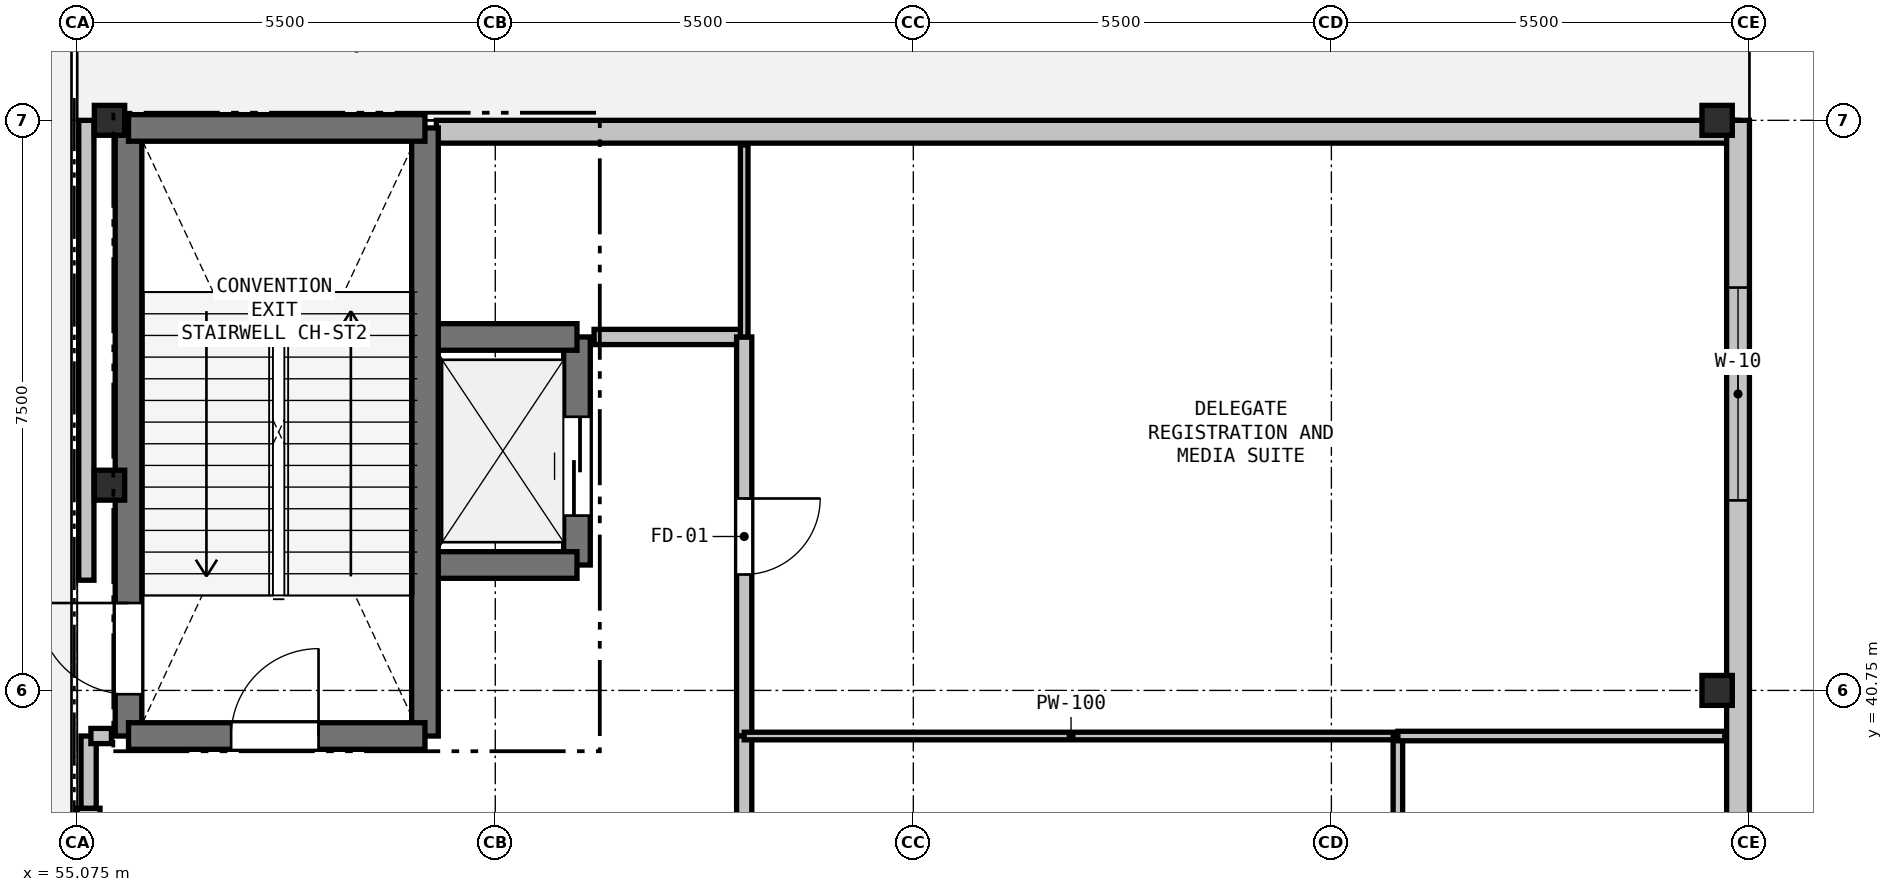
"""IFC4 building model, lengths in metres.
Left out: names, types, materials, properties, quantities, classifications, styles, units other than length and angle.
Written with IfcOpenShell. Run it as: python <this file> out.ifc"""

import sys

from ifc_helpers import new_model, si_unit, direction, frame, frame_2d, origin, origin_2d, place, context, subcontext, project, spatial, rectangle, i_section, extrude, element, fill, save


model = new_model("IFC4")
c1 = context("Model", 3, precision=1e-05, world=origin(), true_north=direction((0.0, 1.0)))
c2 = subcontext(c1, "Body", "Model", "MODEL_VIEW")
j1 = project(units=[si_unit("LENGTHUNIT", "METRE"), si_unit("PLANEANGLEUNIT", "RADIAN")], contexts=[c1])
p1 = place(None, origin())
s1 = spatial("IfcSite", under=j1, at=p1, CompositionType="ELEMENT")
p2 = place(p1, origin())
s2 = spatial("IfcBuilding", under=s1, at=p2, CompositionType="ELEMENT")
p3 = place(p2, origin())
s3 = spatial("IfcBuildingStorey", under=s2, at=p3, CompositionType="ELEMENT", Elevation=0.0)
for number, where, z_axis, x_axis in (
    (1, (55.5, 43.45, 0.0), (0.0, 0.0, 1.0), (1.0, 0.0, 0.0)),
    (2, (55.5, 48.25, 0.0), (0.0, 0.0, 1.0), (1.0, 0.0, 0.0)),
    (3, (76.65, 40.75, 0.0), (0.0, 0.0, 1.0), (1.0, 0.0, 0.0)),
    (4, (76.65, 48.25, 0.0), (0.0, 0.0, 1.0), (1.0, 0.0, 0.0)),
):
    element("IfcColumn", number, at=place(p3, frame(where, z_axis=z_axis, x_axis=x_axis)), inside=s3, PredefinedType="COLUMN", context=c2, shape_type="SweptSolid", body=[
        extrude(i_section(OverallWidth=0.399, OverallDepth=0.394, WebThickness=0.023, FlangeThickness=0.037, at=origin_2d()), origin(), (0.0, 0.0, 1.0), 5.1),
    ])
p4 = place(p3, frame((55.195, 42.2, 0.0), z_axis=(0.0, 0.0, 1.0), x_axis=(0.0, 1.0, 0.0)))
e5 = element("IfcWall", 5, at=p4, inside=s3, PredefinedType="PARAPET", context=c2, shape_type="SweptSolid", body=[
    extrude(rectangle(XDim=6.05, YDim=0.2, at=frame_2d((3.025, 0.0))), origin(), (0.0, 0.0, 1.0), 4.39),
])
p5 = place(p3, frame((59.8, 48.1, 0.0), z_axis=(0.0, 0.0, 1.0), x_axis=(1.0, 0.0, 0.0)))
e6 = element("IfcWall", 6, at=p5, inside=s3, PredefinedType="SOLIDWALL", context=c2, shape_type="SweptSolid", body=[
    extrude(rectangle(XDim=17.125, YDim=0.3, at=frame_2d((8.562, 0.0))), origin(), (0.0, 0.0, 1.0), 3.914),
])
p6 = place(p3, frame((76.925, 48.25, 0.0), z_axis=(0.0, 0.0, 1.0), x_axis=(0.0, -1.0, 0.0)))
e7 = element("IfcWall", 7, at=p6, inside=s3, PredefinedType="SOLIDWALL", context=c2, shape_type="SweptSolid", body=[
    extrude(rectangle(XDim=9.35, YDim=0.3, at=frame_2d((4.675, 0.0))), origin(), (0.0, 0.0, 1.0), 4.39),
])
p7 = place(p6, frame((2.2, 0.0, 0.9)))
e8 = element("IfcOpeningElement", 8, at=p7, cuts=e7, PredefinedType="OPENING", context=c2, shape_type="SweptSolid", body=[
    extrude(rectangle(XDim=2.8, YDim=2.4, at=frame_2d((1.4, 1.2))), frame((0.0, 0.16, 0.0), z_axis=(0.0, -1.0, 0.0), x_axis=(1.0, 0.0, 0.0)), (0.0, 0.0, 1.0), 0.32),
])
p8 = place(p3, frame((55.225, 22.4, 0.0), z_axis=(0.0, 0.0, 1.0), x_axis=(0.0, 1.0, 0.0)))
e9 = element("IfcWall", 9, at=p8, inside=s3, PredefinedType="SOLIDWALL", context=c2, shape_type="SweptSolid", body=[
    extrude(rectangle(XDim=16.8, YDim=0.3, at=frame_2d((8.4, 0.0))), origin(), (0.0, 0.0, 1.0), 2.6),
])
p9 = place(p8, frame((3.5, 0.0, 0.0)))
e10 = element("IfcOpeningElement", 10, at=p9, cuts=e9, PredefinedType="OPENING", context=c2, shape_type="SweptSolid", body=[
    extrude(rectangle(XDim=2.4, YDim=2.4, at=frame_2d((1.2, 1.2))), frame((0.0, 0.16, 0.0), z_axis=(0.0, -1.0, 0.0), x_axis=(1.0, 0.0, 0.0)), (0.0, 0.0, 1.0), 0.32),
])
p10 = place(p8, frame((10.5, 0.0, 0.0)))
e11 = element("IfcOpeningElement", 11, at=p10, cuts=e9, PredefinedType="OPENING", context=c2, shape_type="SweptSolid", body=[
    extrude(rectangle(XDim=2.4, YDim=2.4, at=frame_2d((1.2, 1.2))), frame((0.0, 0.16, 0.0), z_axis=(0.0, -1.0, 0.0), x_axis=(1.0, 0.0, 0.0)), (0.0, 0.0, 1.0), 0.32),
])
p11 = place(p3, frame((61.65, 42.4, 0.0), z_axis=(0.0, 0.0, 1.0), x_axis=(0.0, 1.0, 0.0)))
e12 = element("IfcWall", 12, at=p11, inside=s3, PredefinedType="SHEAR", context=c2, shape_type="SweptSolid", body=[
    extrude(rectangle(XDim=3.0, YDim=0.35, at=frame_2d((1.5, 0.0))), origin(), (0.0, 0.0, 1.0), 4.8),
])
p12 = place(p11, frame((0.65, 0.0, 0.0)))
e13 = element("IfcOpeningElement", 13, at=p12, cuts=e12, PredefinedType="OPENING", context=c2, shape_type="SweptSolid", body=[
    extrude(rectangle(XDim=1.3, YDim=2.2, at=frame_2d((0.65, 1.1))), frame((0.0, 0.185, 0.0), z_axis=(0.0, -1.0, 0.0), x_axis=(1.0, 0.0, 0.0)), (0.0, 0.0, 1.0), 0.37),
])
for number, where, z_axis, x_axis in (
    (14, (59.65, 45.4, 0.0), (0.0, 0.0, 1.0), (1.0, 0.0, 0.0)),
    (15, (59.65, 42.4, 0.0), (0.0, 0.0, 1.0), (1.0, 0.0, 0.0)),
):
    element("IfcWall", number, at=place(p3, frame(where, z_axis=z_axis, x_axis=x_axis)), inside=s3, PredefinedType="SHEAR", context=c2, shape_type="SweptSolid", body=[
        extrude(rectangle(XDim=2.0, YDim=0.35, at=frame_2d((1.0, 0.0))), origin(), (0.0, 0.0, 1.0), 4.8),
    ])
p13 = place(p3, frame((59.65, 48.15, 0.0), z_axis=(0.0, 0.0, 1.0), x_axis=(0.0, -1.0, 0.0)))
e16 = element("IfcWall", 16, at=p13, inside=s3, PredefinedType="SHEAR", context=c2, shape_type="SweptSolid", body=[
    extrude(rectangle(XDim=8.0, YDim=0.35, at=frame_2d((4.0, 0.0))), origin(), (0.0, 0.0, 1.0), 4.8),
])
p14 = place(p3, frame((55.75, 40.15, 0.0), z_axis=(0.0, 0.0, 1.0), x_axis=(0.0, 1.0, 0.0)))
e17 = element("IfcWall", 17, at=p14, inside=s3, PredefinedType="SHEAR", context=c2, shape_type="SweptSolid", body=[
    extrude(rectangle(XDim=8.0, YDim=0.35, at=frame_2d((4.0, 0.0))), origin(), (0.0, 0.0, 1.0), 4.8),
])
p15 = place(p14, frame((0.55, 0.0, 0.0)))
e18 = element("IfcOpeningElement", 18, at=p15, cuts=e17, PredefinedType="OPENING", context=c2, shape_type="SweptSolid", body=[
    extrude(rectangle(XDim=1.2, YDim=2.2, at=frame_2d((0.6, 1.1))), frame((0.0, 0.185, 0.0), z_axis=(0.0, -1.0, 0.0), x_axis=(1.0, 0.0, 0.0)), (0.0, 0.0, 1.0), 0.37),
])
p16 = place(p3, frame((55.75, 48.15, 0.0), z_axis=(0.0, 0.0, 1.0), x_axis=(1.0, 0.0, 0.0)))
e19 = element("IfcWall", 19, at=p16, inside=s3, PredefinedType="SHEAR", context=c2, shape_type="SweptSolid", body=[
    extrude(rectangle(XDim=3.9, YDim=0.35, at=frame_2d((1.95, 0.0))), origin(), (0.0, 0.0, 1.0), 4.8),
])
p17 = place(p3, frame((55.75, 40.15, 0.0), z_axis=(0.0, 0.0, 1.0), x_axis=(1.0, 0.0, 0.0)))
e20 = element("IfcWall", 20, at=p17, inside=s3, PredefinedType="SHEAR", context=c2, shape_type="SweptSolid", body=[
    extrude(rectangle(XDim=3.9, YDim=0.35, at=frame_2d((1.95, 0.0))), origin(), (0.0, 0.0, 1.0), 4.8),
])
p18 = place(p17, frame((1.35, 0.0, 0.0)))
e21 = element("IfcOpeningElement", 21, at=p18, cuts=e20, PredefinedType="OPENING", context=c2, shape_type="SweptSolid", body=[
    extrude(rectangle(XDim=1.15, YDim=2.15, at=frame_2d((0.575, 1.075))), frame((0.0, 0.185, 0.0), z_axis=(0.0, -1.0, 0.0), x_axis=(1.0, 0.0, 0.0)), (0.0, 0.0, 1.0), 0.37),
])
p19 = place(p3, frame((55.225, 39.2, 0.0), z_axis=(0.0, 0.0, 1.0), x_axis=(0.0, 1.0, 0.0)))
e22 = element("IfcWall", 22, at=p19, inside=s3, PredefinedType="PARTITIONING", context=c2, shape_type="SweptSolid", body=[
    extrude(rectangle(XDim=0.95, YDim=0.2, at=frame_2d((0.475, 0.0))), origin(), (0.0, 0.0, 1.0), 4.39),
])
p20 = place(p3, frame((55.255, 40.15, 0.0), z_axis=(0.0, 0.0, 1.0), x_axis=(1.0, 0.0, 0.0)))
e23 = element("IfcWall", 23, at=p20, inside=s3, PredefinedType="PARTITIONING", context=c2, shape_type="SweptSolid", body=[
    extrude(rectangle(XDim=0.27, YDim=0.2, at=frame_2d((0.135, 0.0))), origin(), (0.0, 0.0, 1.0), 4.39),
])
p21 = place(p3, frame((61.875, 45.4, 0.0), z_axis=(0.0, 0.0, 1.0), x_axis=(1.0, 0.0, 0.0)))
e24 = element("IfcWall", 24, at=p21, inside=s3, PredefinedType="PARTITIONING", context=c2, shape_type="SweptSolid", body=[
    extrude(rectangle(XDim=1.975, YDim=0.2, at=frame_2d((0.988, 0.0))), origin(), (0.0, 0.0, 1.0), 4.356),
])
p22 = place(p3, frame((63.85, 45.4, 0.0), z_axis=(0.0, 0.0, 1.0), x_axis=(0.0, -1.0, 0.0)))
e25 = element("IfcWall", 25, at=p22, inside=s3, PredefinedType="PARTITIONING", context=c2, shape_type="SweptSolid", body=[
    extrude(rectangle(XDim=5.25, YDim=0.2, at=frame_2d((2.625, 0.0))), origin(), (0.0, 0.0, 1.0), 3.914),
])
p23 = place(p22, frame((2.125, 0.0, 0.0)))
e26 = element("IfcOpeningElement", 26, at=p23, cuts=e25, PredefinedType="OPENING", context=c2, shape_type="SweptSolid", body=[
    extrude(rectangle(XDim=1.0, YDim=2.15, at=frame_2d((0.5, 1.075))), frame((0.0, 0.11, 0.0), z_axis=(0.0, -1.0, 0.0), x_axis=(1.0, 0.0, 0.0)), (0.0, 0.0, 1.0), 0.22),
])
p24 = place(p3, frame((63.85, 40.15, 0.0), z_axis=(0.0, 0.0, 1.0), x_axis=(0.0, -1.0, 0.0)))
e27 = element("IfcWall", 27, at=p24, inside=s3, PredefinedType="PARTITIONING", context=c2, shape_type="SweptSolid", body=[
    extrude(rectangle(XDim=18.25, YDim=0.2, at=frame_2d((9.125, 0.0))), origin(), (0.0, 0.0, 1.0), 3.914),
])
p25 = place(p24, frame((8.225, 0.0, 0.0)))
e28 = element("IfcOpeningElement", 28, at=p25, cuts=e27, PredefinedType="OPENING", context=c2, shape_type="SweptSolid", body=[
    extrude(rectangle(XDim=1.8, YDim=2.2, at=frame_2d((0.9, 1.1))), frame((0.0, 0.11, 0.0), z_axis=(0.0, -1.0, 0.0), x_axis=(1.0, 0.0, 0.0)), (0.0, 0.0, 1.0), 0.22),
])
p26 = place(p3, frame((63.85, 40.15, 0.0), z_axis=(0.0, 0.0, 1.0), x_axis=(1.0, 0.0, 0.0)))
e29 = element("IfcWall", 29, at=p26, inside=s3, PredefinedType="PARTITIONING", context=c2, shape_type="SweptSolid", body=[
    extrude(rectangle(XDim=8.6, YDim=0.1, at=frame_2d((4.3, 0.0))), origin(), (0.0, 0.0, 1.0), 4.356),
])
p27 = place(p3, frame((72.45, 40.15, 0.0), z_axis=(0.0, 0.0, 1.0), x_axis=(0.0, -1.0, 0.0)))
e30 = element("IfcWall", 30, at=p27, inside=s3, PredefinedType="PARTITIONING", context=c2, shape_type="SweptSolid", body=[
    extrude(rectangle(XDim=10.025, YDim=0.125, at=frame_2d((5.012, 0.0))), origin(), (0.0, 0.0, 1.0), 3.914),
])
p28 = place(p3, frame((63.85, 45.4, 0.0), z_axis=(0.0, 0.0, 1.0), x_axis=(0.0, 1.0, 0.0)))
e31 = element("IfcWall", 31, at=p28, inside=s3, PredefinedType="PARTITIONING", context=c2, shape_type="SweptSolid", body=[
    extrude(rectangle(XDim=2.526, YDim=0.1, at=frame_2d((1.263, 0.0))), origin(), (0.0, 0.0, 1.0), 4.8),
])
p29 = place(p3, frame((76.751, 40.15, 0.0), z_axis=(0.0, 0.0, 1.0), x_axis=(-1.0, 0.0, 0.0)))
e32 = element("IfcWall", 32, at=p29, inside=s3, PredefinedType="PARTITIONING", context=c2, shape_type="SweptSolid", body=[
    extrude(rectangle(XDim=4.301, YDim=0.125, at=frame_2d((2.15, 0.0))), origin(), (0.0, 0.0, 1.0), 4.39),
])
p30 = place(p7, origin())
e33 = element("IfcWindow", 33, at=p30, inside=s3, PartitioningType="SINGLE_PANEL", PredefinedType="WINDOW", context=c2, shape_type="SweptSolid", body=[
    extrude(rectangle(XDim=2.8, YDim=2.4, at=frame_2d((1.4, 1.2))), frame((0.0, 0.03, 0.0), z_axis=(0.0, -1.0, 0.0), x_axis=(1.0, 0.0, 0.0)), (0.0, 0.0, 1.0), 0.06),
])
fill(e8, e33)
p31 = place(p12, origin())
e34 = element("IfcDoor", 34, at=p31, inside=s3, OperationType="SLIDING_TO_LEFT", PredefinedType="DOOR", context=c2, shape_type="SweptSolid", body=[
    extrude(rectangle(XDim=1.3, YDim=2.2, at=frame_2d((0.65, 1.1))), frame((0.0, 0.025, 0.0), z_axis=(0.0, -1.0, 0.0), x_axis=(1.0, 0.0, 0.0)), (0.0, 0.0, 1.0), 0.05),
])
fill(e13, e34)
p32 = place(p18, origin())
e35 = element("IfcDoor", 35, at=p32, inside=s3, OperationType="SINGLE_SWING_RIGHT", PredefinedType="DOOR", context=c2, shape_type="SweptSolid", body=[
    extrude(rectangle(XDim=1.15, YDim=2.15, at=frame_2d((0.575, 1.075))), frame((0.0, 0.025, 0.0), z_axis=(0.0, -1.0, 0.0), x_axis=(1.0, 0.0, 0.0)), (0.0, 0.0, 1.0), 0.05),
])
fill(e21, e35)
p33 = place(p15, origin())
e36 = element("IfcDoor", 36, at=p33, inside=s3, OperationType="SINGLE_SWING_RIGHT", PredefinedType="DOOR", context=c2, shape_type="SweptSolid", body=[
    extrude(rectangle(XDim=1.2, YDim=2.2, at=frame_2d((0.6, 1.1))), frame((0.0, 0.025, 0.0), z_axis=(0.0, -1.0, 0.0), x_axis=(1.0, 0.0, 0.0)), (0.0, 0.0, 1.0), 0.05),
])
fill(e18, e36)
p34 = place(p23, origin())
e37 = element("IfcDoor", 37, at=p34, inside=s3, OperationType="SINGLE_SWING_LEFT", PredefinedType="DOOR", context=c2, shape_type="SweptSolid", body=[
    extrude(rectangle(XDim=1.0, YDim=2.15, at=frame_2d((0.5, 1.075))), frame((0.0, 0.025, 0.0), z_axis=(0.0, -1.0, 0.0), x_axis=(1.0, 0.0, 0.0)), (0.0, 0.0, 1.0), 0.05),
])
fill(e26, e37)
save(model, sys.argv[1])
